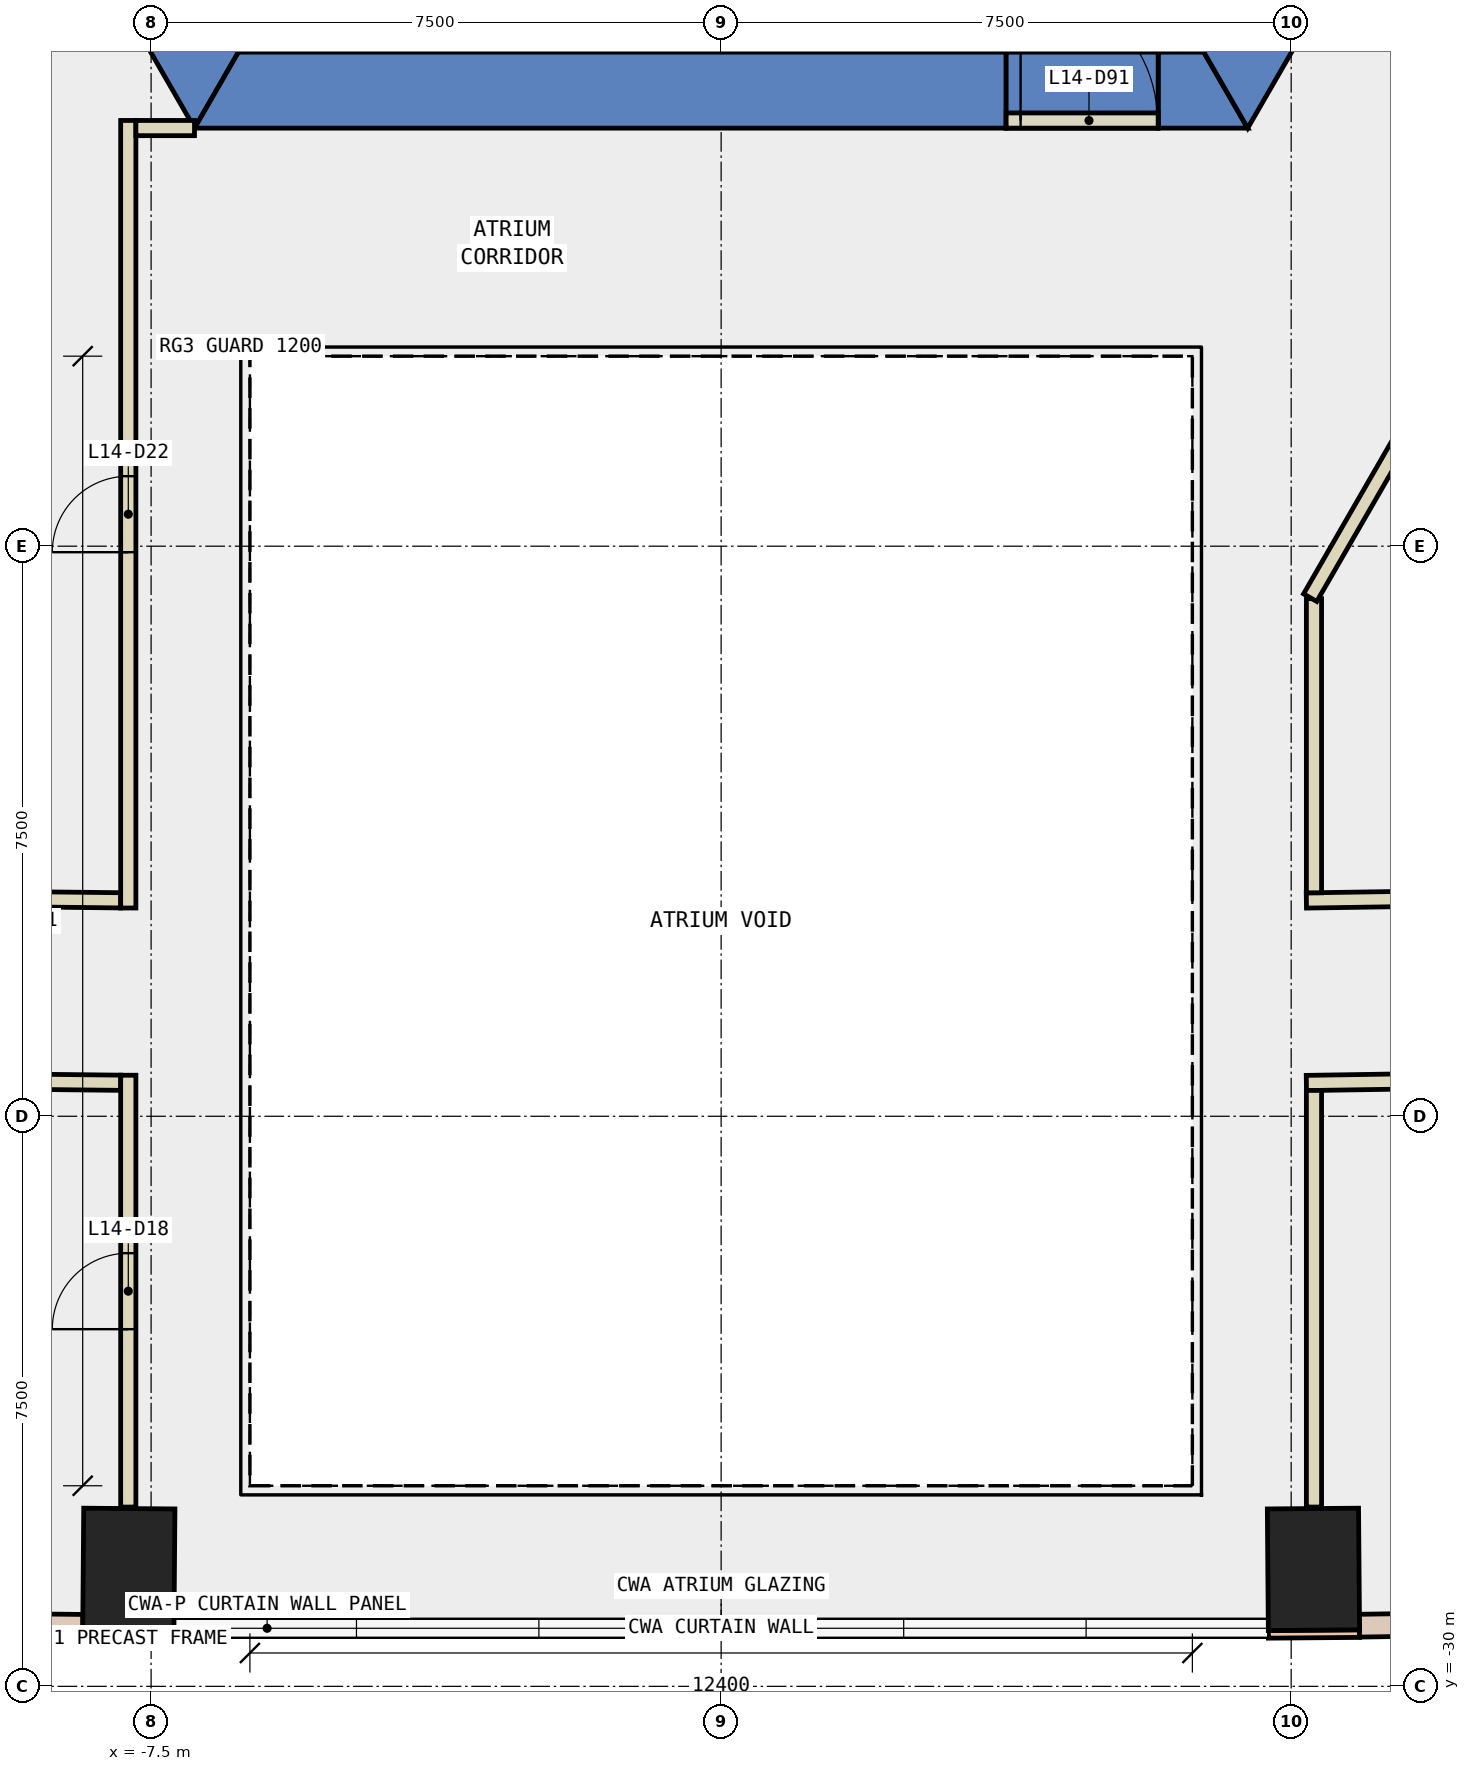
"""IFC4 building model, lengths in metres.
Left out: names, types, materials, properties, quantities, classifications, styles, units other than length and angle.
Written with IfcOpenShell. Run it as: python <this file> out.ifc"""

import sys

from ifc_helpers import new_model, si_unit, direction, frame, frame_2d, origin, origin_2d, place, context, subcontext, project, spatial, polyline, rectangle, outline, extrude, element, fill, save


model = new_model("IFC4")
c1 = context("Model", 3, precision=1e-05, world=origin(), true_north=direction((0.0, 1.0)))
c2 = subcontext(c1, "Body", "Model", "MODEL_VIEW")
j1 = project(units=[si_unit("LENGTHUNIT", "METRE"), si_unit("PLANEANGLEUNIT", "RADIAN")], contexts=[c1])
p1 = place(None, origin())
s1 = spatial("IfcSite", under=j1, at=p1, CompositionType="ELEMENT")
p2 = place(p1, origin())
s2 = spatial("IfcBuilding", under=s1, at=p2, CompositionType="ELEMENT")
p3 = place(p2, frame((0.0, 0.0, 68.6)))
s3 = spatial("IfcBuildingStorey", under=s2, at=p3, CompositionType="ELEMENT", Elevation=68.6)
for number, where, z_axis, x_axis in (
    (1, (-7.793, -28.461, -0.4), (0.0, 0.0, 1.0), (-1.0, 0.008, 0.0)),
    (2, (7.793, -28.461, -0.4), (0.0, 0.0, 1.0), (1.0, 0.008, 0.0)),
):
    element("IfcColumn", number, at=place(p3, frame(where, z_axis=z_axis, x_axis=x_axis)), inside=s3, PredefinedType="COLUMN", context=c2, shape_type="SweptSolid", body=[
        extrude(rectangle(XDim=1.2, YDim=1.6, at=origin_2d()), origin(), (0.0, 0.0, 1.0), 4.2),
    ])
p4 = place(p3, frame((0.0, 0.0, -0.4)))
e3 = element("IfcWall", 3, at=p4, inside=s3, PredefinedType="SHEAR", context=c2, shape_type="SweptSolid", body=[
    extrude(outline(polyline([(-13.856, 2.5), (-6.928, -9.5), (-6.351, -8.5), (-12.702, 2.5), (-13.856, 2.5)])), origin(), (0.0, 0.0, 1.0), 4.2),
])
p5 = place(p3, frame((0.0, 0.0, -0.4)))
e4 = element("IfcWall", 4, at=p5, inside=s3, PredefinedType="SHEAR", context=c2, shape_type="SweptSolid", body=[
    extrude(outline(polyline([(3.75, -9.5), (3.75, -8.5), (-6.351, -8.5), (-6.928, -9.5), (3.75, -9.5)])), origin(), (0.0, 0.0, 1.0), 4.2),
])
p6 = place(p3, frame((0.0, 0.0, -0.4)))
e5 = element("IfcWall", 5, at=p6, inside=s3, PredefinedType="SHEAR", context=c2, shape_type="SweptSolid", body=[
    extrude(outline(polyline([(5.75, -8.5), (5.75, -9.5), (6.928, -9.5), (6.351, -8.5), (5.75, -8.5)])), origin(), (0.0, 0.0, 1.0), 4.2),
])
p7 = place(p3, frame((0.0, 0.0, 3.6)))
e6 = element("IfcWall", 6, at=p7, inside=s3, PredefinedType="SHEAR", context=c2, shape_type="SweptSolid", body=[
    extrude(outline(polyline([(5.75, -9.5), (5.75, -8.5), (3.75, -8.5), (3.75, -9.5), (5.75, -9.5)])), origin(), (0.0, 0.0, 1.0), 0.2),
])
p8 = place(p3, frame((0.0, 0.0, -0.4)))
e7 = element("IfcWall", 7, at=p8, inside=s3, PredefinedType="SHEAR", context=c2, shape_type="SweptSolid", body=[
    extrude(outline(polyline([(8.117, -7.44), (7.252, -6.94), (6.351, -8.5), (6.928, -9.5), (8.117, -7.44)])), origin(), (0.0, 0.0, 1.0), 4.2),
])
for number, where, z_axis, x_axis in (
    (8, (-8.4, -29.306, 0.0), (0.0, 0.0, 1.0), (1.0, -0.008, 0.0)),
    (9, (7.2, -29.316, 0.0), (0.0, 0.0, 1.0), (1.0, 0.008, 0.0)),
):
    element("IfcWall", number, at=place(p3, frame(where, z_axis=z_axis, x_axis=x_axis)), inside=s3, PredefinedType="STANDARD", context=c2, shape_type="SweptSolid", body=[
        extrude(rectangle(XDim=1.2, YDim=0.1, at=frame_2d((0.6, 0.0))), origin(), (0.0, 0.0, 1.0), 3.8),
    ])
p9 = place(p3, frame((-15.568, -29.125, 0.0), z_axis=(0.0, 0.0, 1.0), x_axis=(0.999939152594, -0.011031369316, 0.0)))
e10 = element("IfcWall", 10, at=p9, inside=s3, PredefinedType="STANDARD", context=c2, shape_type="SweptSolid", body=[
    extrude(rectangle(XDim=7.171, YDim=0.3, at=frame_2d((3.585, 0.0))), origin(), (0.0, 0.0, 1.0), 3.8),
])
p10 = place(p9, frame((0.593, 0.0, 0.9)))
e11 = element("IfcOpeningElement", 11, at=p10, cuts=e10, PredefinedType="OPENING", context=c2, shape_type="SweptSolid", body=[
    extrude(rectangle(XDim=2.4, YDim=2.6, at=frame_2d((1.2, 1.3))), frame((0.0, 0.16, 0.0), z_axis=(0.0, -1.0, 0.0), x_axis=(1.0, 0.0, 0.0)), (0.0, 0.0, 1.0), 0.32),
])
p11 = place(p9, frame((4.178, 0.0, 0.9)))
e12 = element("IfcOpeningElement", 12, at=p11, cuts=e10, PredefinedType="OPENING", context=c2, shape_type="SweptSolid", body=[
    extrude(rectangle(XDim=2.4, YDim=2.6, at=frame_2d((1.2, 1.3))), frame((0.0, 0.16, 0.0), z_axis=(0.0, -1.0, 0.0), x_axis=(1.0, 0.0, 0.0)), (0.0, 0.0, 1.0), 0.32),
])
p12 = place(p3, frame((8.398, -29.202, 0.0), z_axis=(0.0, 0.0, 1.0), x_axis=(0.99988053916, 0.015456629942, 0.0)))
e13 = element("IfcWall", 13, at=p12, inside=s3, PredefinedType="STANDARD", context=c2, shape_type="SweptSolid", body=[
    extrude(rectangle(XDim=7.171, YDim=0.3, at=frame_2d((3.585, 0.0))), origin(), (0.0, 0.0, 1.0), 3.8),
])
p13 = place(p12, frame((0.593, 0.0, 0.9)))
e14 = element("IfcOpeningElement", 14, at=p13, cuts=e13, PredefinedType="OPENING", context=c2, shape_type="SweptSolid", body=[
    extrude(rectangle(XDim=2.4, YDim=2.6, at=frame_2d((1.2, 1.3))), frame((0.0, 0.16, 0.0), z_axis=(0.0, -1.0, 0.0), x_axis=(1.0, 0.0, 0.0)), (0.0, 0.0, 1.0), 0.32),
])
p14 = place(p12, frame((4.178, 0.0, 0.9)))
e15 = element("IfcOpeningElement", 15, at=p14, cuts=e13, PredefinedType="OPENING", context=c2, shape_type="SweptSolid", body=[
    extrude(rectangle(XDim=2.4, YDim=2.6, at=frame_2d((1.2, 1.3))), frame((0.0, 0.16, 0.0), z_axis=(0.0, -1.0, 0.0), x_axis=(1.0, 0.0, 0.0)), (0.0, 0.0, 1.0), 0.32),
])
p15 = place(p3, frame((7.7, -19.661, 0.0), z_axis=(0.0, 0.0, 1.0), x_axis=(0.999882138464, 0.015352823245, 0.0)))
e16 = element("IfcWall", 16, at=p15, inside=s3, PredefinedType="PARTITIONING", context=c2, shape_type="SweptSolid", body=[
    extrude(rectangle(XDim=8.269, YDim=0.2, at=frame_2d((4.135, 0.0))), origin(), (0.0, 0.0, 1.0), 3.8),
])
p16 = place(p15, frame((3.235, 0.0, 0.0)))
e17 = element("IfcOpeningElement", 17, at=p16, cuts=e16, PredefinedType="OPENING", context=c2, shape_type="SweptSolid", body=[
    extrude(rectangle(XDim=1.8, YDim=2.1, at=frame_2d((0.9, 1.05))), frame((0.0, 0.11, 0.0), z_axis=(0.0, -1.0, 0.0), x_axis=(1.0, 0.0, 0.0)), (0.0, 0.0, 1.0), 0.22),
])
p17 = place(p3, frame((-9.776, -19.638, 0.0), z_axis=(0.0, 0.0, 1.0), x_axis=(0.999937374473, -0.011191386544, 0.0)))
e18 = element("IfcWall", 18, at=p17, inside=s3, PredefinedType="PARTITIONING", context=c2, shape_type="SweptSolid", body=[
    extrude(rectangle(XDim=1.876, YDim=0.2, at=frame_2d((0.938, 0.0))), origin(), (0.0, 0.0, 1.0), 3.8),
])
p18 = place(p3, frame((16.018, -21.933, 0.0), z_axis=(0.0, 0.0, 1.0), x_axis=(-0.999879942341, -0.015495189738, 0.0)))
e19 = element("IfcWall", 19, at=p18, inside=s3, PredefinedType="PARTITIONING", context=c2, shape_type="SweptSolid", body=[
    extrude(rectangle(XDim=8.319, YDim=0.2, at=frame_2d((4.16, 0.0))), origin(), (0.0, 0.0, 1.0), 3.8),
])
p19 = place(p18, frame((3.66, 0.0, 0.0)))
e20 = element("IfcOpeningElement", 20, at=p19, cuts=e19, PredefinedType="OPENING", context=c2, shape_type="SweptSolid", body=[
    extrude(rectangle(XDim=1.0, YDim=2.1, at=frame_2d((0.5, 1.05))), frame((0.0, 0.11, 0.0), z_axis=(0.0, -1.0, 0.0), x_axis=(1.0, 0.0, 0.0)), (0.0, 0.0, 1.0), 0.22),
])
p20 = place(p3, frame((-7.9, -22.059, 0.0), z_axis=(0.0, 0.0, 1.0), x_axis=(-0.999940210022, 0.010935098606, 0.0)))
e21 = element("IfcWall", 21, at=p20, inside=s3, PredefinedType="PARTITIONING", context=c2, shape_type="SweptSolid", body=[
    extrude(rectangle(XDim=3.929, YDim=0.2, at=frame_2d((1.965, 0.0))), origin(), (0.0, 0.0, 1.0), 3.8),
])
p21 = place(p3, frame((7.8, -15.69, 0.0), z_axis=(0.0, 0.0, 1.0), x_axis=(0.0, -1.0, 0.0)))
e22 = element("IfcWall", 22, at=p21, inside=s3, PredefinedType="PARTITIONING", context=c2, shape_type="SweptSolid", body=[
    extrude(rectangle(XDim=3.87, YDim=0.2, at=frame_2d((1.935, 0.0))), origin(), (0.0, 0.0, 1.0), 3.8),
])
p22 = place(p3, frame((-7.8, -19.76, 0.0), z_axis=(0.0, 0.0, 1.0), x_axis=(0.0, 1.0, 0.0)))
e23 = element("IfcWall", 23, at=p22, inside=s3, PredefinedType="PARTITIONING", context=c2, shape_type="SweptSolid", body=[
    extrude(rectangle(XDim=10.361, YDim=0.2, at=frame_2d((5.181, 0.0))), origin(), (0.0, 0.0, 1.0), 3.8),
])
p23 = place(p22, frame((4.681, 0.0, 0.0)))
e24 = element("IfcOpeningElement", 24, at=p23, cuts=e23, PredefinedType="OPENING", context=c2, shape_type="SweptSolid", body=[
    extrude(rectangle(XDim=1.0, YDim=2.1, at=frame_2d((0.5, 1.05))), frame((0.0, 0.11, 0.0), z_axis=(0.0, -1.0, 0.0), x_axis=(1.0, 0.0, 0.0)), (0.0, 0.0, 1.0), 0.22),
])
p24 = place(p3, frame((-7.7, -9.499, 0.0), z_axis=(0.0, 0.0, 1.0), x_axis=(1.0, 0.0, 0.0)))
e25 = element("IfcWall", 25, at=p24, inside=s3, PredefinedType="PARTITIONING", context=c2, shape_type="SweptSolid", body=[
    extrude(rectangle(XDim=0.771, YDim=0.2, at=frame_2d((0.385, 0.0))), origin(), (0.0, 0.0, 1.0), 3.8),
])
p25 = place(p3, frame((7.8, -22.16, 0.0), z_axis=(0.0, 0.0, 1.0), x_axis=(0.0, -1.0, 0.0)))
e26 = element("IfcWall", 26, at=p25, inside=s3, PredefinedType="PARTITIONING", context=c2, shape_type="SweptSolid", body=[
    extrude(rectangle(XDim=5.481, YDim=0.2, at=frame_2d((2.741, 0.0))), origin(), (0.0, 0.0, 1.0), 3.8),
])
p26 = place(p3, frame((-7.8, -27.641, 0.0), z_axis=(0.0, 0.0, 1.0), x_axis=(0.0, 1.0, 0.0)))
e27 = element("IfcWall", 27, at=p26, inside=s3, PredefinedType="PARTITIONING", context=c2, shape_type="SweptSolid", body=[
    extrude(rectangle(XDim=5.681, YDim=0.2, at=frame_2d((2.841, 0.0))), origin(), (0.0, 0.0, 1.0), 3.8),
])
p27 = place(p26, frame((2.34, 0.0, 0.0)))
e28 = element("IfcOpeningElement", 28, at=p27, cuts=e27, PredefinedType="OPENING", context=c2, shape_type="SweptSolid", body=[
    extrude(rectangle(XDim=1.0, YDim=2.1, at=frame_2d((0.5, 1.05))), frame((0.0, 0.11, 0.0), z_axis=(0.0, -1.0, 0.0), x_axis=(1.0, 0.0, 0.0)), (0.0, 0.0, 1.0), 0.22),
])
p28 = place(p3, frame((3.75, -9.4, 0.0), z_axis=(0.0, 0.0, 1.0), x_axis=(1.0, 0.0, 0.0)))
e29 = element("IfcWall", 29, at=p28, inside=s3, PredefinedType="PARTITIONING", context=c2, shape_type="SweptSolid", body=[
    extrude(rectangle(XDim=2.0, YDim=0.2, at=frame_2d((1.0, 0.0))), origin(), (0.0, 0.0, 1.0), 2.4),
])
p29 = place(p28, frame((0.19, 0.0, 0.0)))
e30 = element("IfcOpeningElement", 30, at=p29, cuts=e29, PredefinedType="OPENING", context=c2, shape_type="SweptSolid", body=[
    extrude(rectangle(XDim=1.8, YDim=2.1, at=frame_2d((0.9, 1.05))), frame((0.0, 0.11, 0.0), z_axis=(0.0, -1.0, 0.0), x_axis=(1.0, 0.0, 0.0)), (0.0, 0.0, 1.0), 0.22),
])
p30 = place(p3, frame((12.401, -7.622, 0.0), z_axis=(0.0, 0.0, 1.0), x_axis=(-0.500029185841, -0.866008552675, 0.0)))
e31 = element("IfcWall", 31, at=p30, inside=s3, PredefinedType="PARTITIONING", context=c2, shape_type="SweptSolid", body=[
    extrude(rectangle(XDim=9.301, YDim=0.2, at=frame_2d((4.651, 0.0))), origin(), (0.0, 0.0, 1.0), 3.8),
])
p31 = place(p27, origin())
e32 = element("IfcDoor", 32, at=p31, inside=s3, OperationType="SINGLE_SWING_LEFT", PredefinedType="DOOR", context=c2, shape_type="SweptSolid", body=[
    extrude(rectangle(XDim=1.0, YDim=2.1, at=frame_2d((0.5, 1.05))), frame((0.0, 0.025, 0.0), z_axis=(0.0, -1.0, 0.0), x_axis=(1.0, 0.0, 0.0)), (0.0, 0.0, 1.0), 0.05),
])
fill(e28, e32)
p32 = place(p23, origin())
e33 = element("IfcDoor", 33, at=p32, inside=s3, OperationType="SINGLE_SWING_LEFT", PredefinedType="DOOR", context=c2, shape_type="SweptSolid", body=[
    extrude(rectangle(XDim=1.0, YDim=2.1, at=frame_2d((0.5, 1.05))), frame((0.0, 0.025, 0.0), z_axis=(0.0, -1.0, 0.0), x_axis=(1.0, 0.0, 0.0)), (0.0, 0.0, 1.0), 0.05),
])
fill(e24, e33)
p33 = place(p29, origin())
e34 = element("IfcDoor", 34, at=p33, inside=s3, OperationType="DOUBLE_DOOR_SINGLE_SWING", PredefinedType="DOOR", context=c2, shape_type="SweptSolid", body=[
    extrude(rectangle(XDim=1.8, YDim=2.1, at=frame_2d((0.9, 1.05))), frame((0.0, 0.025, 0.0), z_axis=(0.0, -1.0, 0.0), x_axis=(1.0, 0.0, 0.0)), (0.0, 0.0, 1.0), 0.05),
])
fill(e30, e34)
save(model, sys.argv[1])
